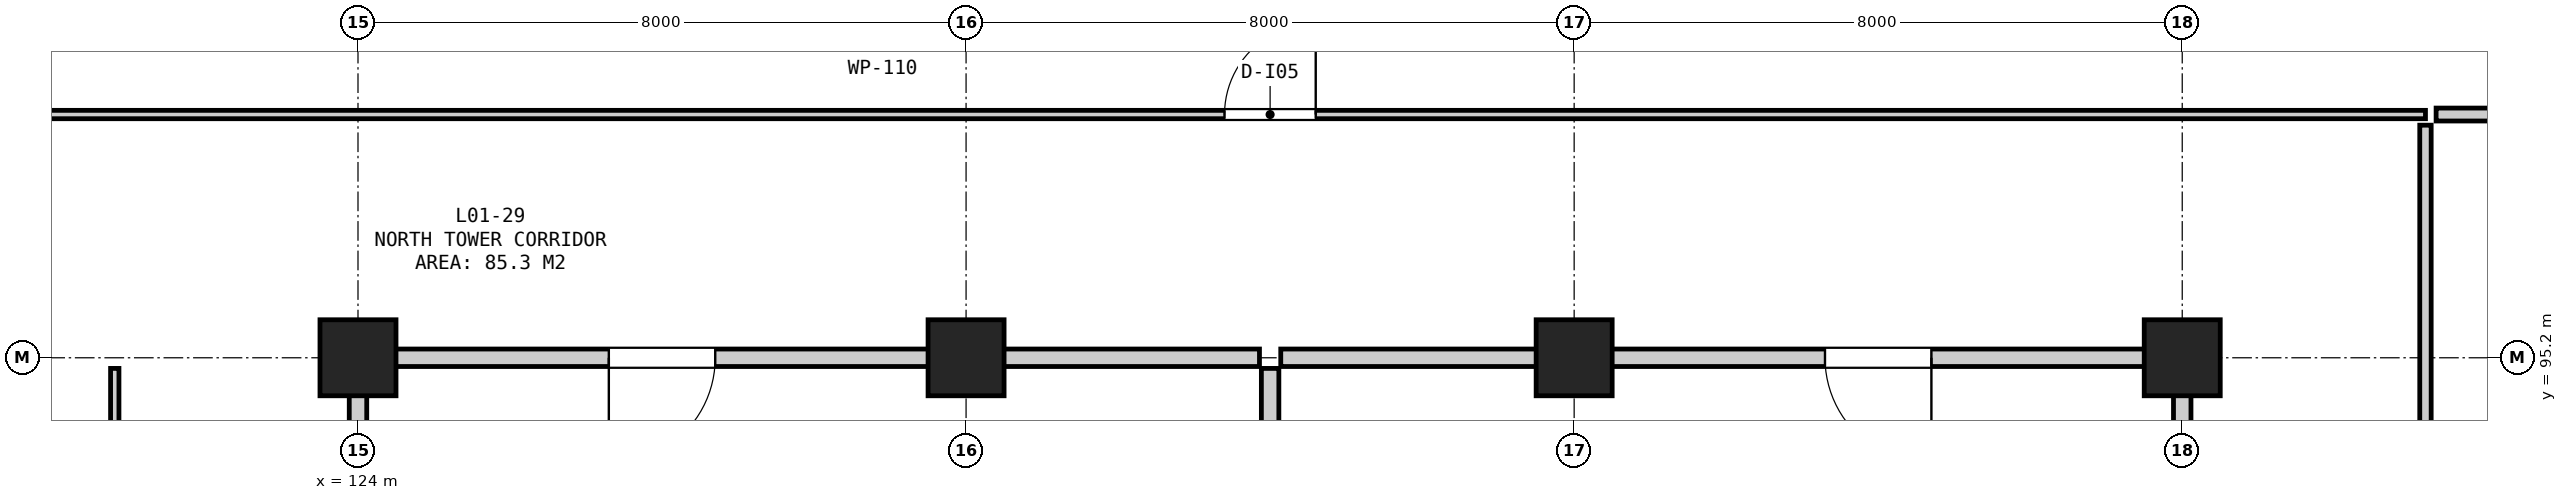
"""IFC4 building model, lengths in metres.
Left out: names, types, materials, properties, quantities, classifications, styles, units other than length and angle.
Written with IfcOpenShell. Run it as: python <this file> out.ifc"""

import sys

from ifc_helpers import new_model, si_unit, direction, frame, frame_2d, origin, origin_2d, place, context, subcontext, project, spatial, rectangle, extrude, element, fill, save


model = new_model("IFC4")
c1 = context("Model", 3, precision=1e-05, world=origin(), true_north=direction((0.0, 1.0)))
c2 = subcontext(c1, "Body", "Model", "MODEL_VIEW")
j1 = project(units=[si_unit("LENGTHUNIT", "METRE"), si_unit("PLANEANGLEUNIT", "RADIAN")], contexts=[c1])
p1 = place(None, origin())
s1 = spatial("IfcSite", under=j1, at=p1, CompositionType="ELEMENT")
p2 = place(p1, origin())
s2 = spatial("IfcBuilding", under=s1, at=p2, CompositionType="ELEMENT")
p3 = place(p2, frame((0.0, 0.0, 5.4)))
s3 = spatial("IfcBuildingStorey", under=s2, at=p3, CompositionType="ELEMENT", Elevation=5.4)
for number, where, z_axis, x_axis in (
    (1, (124.0, 95.2, 0.0), (0.0, 0.0, 1.0), (1.0, 0.0, 0.0)),
    (2, (132.0, 95.2, 0.0), (0.0, 0.0, 1.0), (1.0, 0.0, 0.0)),
    (3, (140.0, 95.2, 0.0), (0.0, 0.0, 1.0), (1.0, 0.0, 0.0)),
    (4, (148.0, 95.2, 0.0), (0.0, 0.0, 1.0), (1.0, 0.0, 0.0)),
):
    element("IfcColumn", number, at=place(p3, frame(where, z_axis=z_axis, x_axis=x_axis)), inside=s3, PredefinedType="COLUMN", context=c2, shape_type="SweptSolid", body=[
        extrude(rectangle(XDim=1.0, YDim=1.0, at=origin_2d()), origin(), (0.0, 0.0, 1.0), 5.4),
    ])
p4 = place(p3, frame((124.14, 95.2, 0.0), z_axis=(0.0, 0.0, 1.0), x_axis=(1.0, 0.0, 0.0)))
e5 = element("IfcWall", 5, at=p4, inside=s3, PredefinedType="SOLIDWALL", context=c2, shape_type="SweptSolid", body=[
    extrude(rectangle(XDim=11.72, YDim=0.23, at=frame_2d((5.86, 0.0))), origin(), (0.0, 0.0, 1.0), 4.535),
])
p5 = place(p4, frame((3.16, 0.0, 0.0)))
e6 = element("IfcOpeningElement", 6, at=p5, cuts=e5, PredefinedType="OPENING", context=c2, shape_type="SweptSolid", body=[
    extrude(rectangle(XDim=1.4, YDim=2.2, at=frame_2d((0.7, 1.1))), frame((0.0, 0.127, 0.0), z_axis=(0.0, -1.0, 0.0), x_axis=(1.0, 0.0, 0.0)), (0.0, 0.0, 1.0), 0.254),
])
p6 = place(p3, frame((124.0, 91.54, 0.0), z_axis=(0.0, 0.0, 1.0), x_axis=(0.0, 1.0, 0.0)))
e7 = element("IfcWall", 7, at=p6, inside=s3, PredefinedType="SOLIDWALL", context=c2, shape_type="SweptSolid", body=[
    extrude(rectangle(XDim=3.52, YDim=0.23, at=frame_2d((1.76, 0.0))), origin(), (0.0, 0.0, 1.0), 4.585),
])
p7 = place(p3, frame((136.0, 91.54, 0.0), z_axis=(0.0, 0.0, 1.0), x_axis=(0.0, 1.0, 0.0)))
e8 = element("IfcWall", 8, at=p7, inside=s3, PredefinedType="SOLIDWALL", context=c2, shape_type="SweptSolid", body=[
    extrude(rectangle(XDim=3.52, YDim=0.23, at=frame_2d((1.76, 0.0))), origin(), (0.0, 0.0, 1.0), 5.1),
])
p8 = place(p3, frame((136.14, 95.2, 0.0), z_axis=(0.0, 0.0, 1.0), x_axis=(1.0, 0.0, 0.0)))
e9 = element("IfcWall", 9, at=p8, inside=s3, PredefinedType="SOLIDWALL", context=c2, shape_type="SweptSolid", body=[
    extrude(rectangle(XDim=11.72, YDim=0.23, at=frame_2d((5.86, 0.0))), origin(), (0.0, 0.0, 1.0), 4.535),
])
p9 = place(p8, frame((7.16, 0.0, 0.0)))
e10 = element("IfcOpeningElement", 10, at=p9, cuts=e9, PredefinedType="OPENING", context=c2, shape_type="SweptSolid", body=[
    extrude(rectangle(XDim=1.4, YDim=2.2, at=frame_2d((0.7, 1.1))), frame((0.0, 0.127, 0.0), z_axis=(0.0, -1.0, 0.0), x_axis=(1.0, 0.0, 0.0)), (0.0, 0.0, 1.0), 0.254),
])
p10 = place(p3, frame((148.0, 91.54, 0.0), z_axis=(0.0, 0.0, 1.0), x_axis=(0.0, 1.0, 0.0)))
e11 = element("IfcWall", 11, at=p10, inside=s3, PredefinedType="SOLIDWALL", context=c2, shape_type="SweptSolid", body=[
    extrude(rectangle(XDim=3.52, YDim=0.23, at=frame_2d((1.76, 0.0))), origin(), (0.0, 0.0, 1.0), 4.485),
])
p11 = place(p3, frame((120.8, 87.34, 0.0), z_axis=(0.0, 0.0, 1.0), x_axis=(0.0, 1.0, 0.0)))
e12 = element("IfcWall", 12, at=p11, inside=s3, PredefinedType="PARTITIONING", context=c2, shape_type="SweptSolid", body=[
    extrude(rectangle(XDim=7.72, YDim=0.11, at=frame_2d((3.86, 0.0))), origin(), (0.0, 0.0, 1.0), 5.1),
])
p12 = place(p3, frame((151.34, 98.4, 0.0), z_axis=(0.0, 0.0, 1.0), x_axis=(1.0, 0.0, 0.0)))
e13 = element("IfcWall", 13, at=p12, inside=s3, PredefinedType="PARTITIONING", context=c2, shape_type="SweptSolid", body=[
    extrude(rectangle(XDim=16.455, YDim=0.17, at=frame_2d((8.228, 0.0))), origin(), (0.0, 0.0, 1.0), 5.1),
])
p13 = place(p3, frame((151.2, 76.14, 0.0), z_axis=(0.0, 0.0, 1.0), x_axis=(0.0, 1.0, 0.0)))
e14 = element("IfcWall", 14, at=p13, inside=s3, PredefinedType="PARTITIONING", context=c2, shape_type="SweptSolid", body=[
    extrude(rectangle(XDim=22.12, YDim=0.15, at=frame_2d((11.06, 0.0))), origin(), (0.0, 0.0, 1.0), 5.1),
])
p14 = place(p13, frame((10.46, 0.0, 0.0)))
e15 = element("IfcOpeningElement", 15, at=p14, cuts=e14, PredefinedType="OPENING", context=c2, shape_type="SweptSolid", body=[
    extrude(rectangle(XDim=1.2, YDim=2.15, at=frame_2d((0.6, 1.075))), frame((0.0, 0.087, 0.0), z_axis=(0.0, -1.0, 0.0), x_axis=(1.0, 0.0, 0.0)), (0.0, 0.0, 1.0), 0.174),
])
p15 = place(p3, frame((110.605, 98.4, 0.0), z_axis=(0.0, 0.0, 1.0), x_axis=(1.0, 0.0, 0.0)))
e16 = element("IfcWall", 16, at=p15, inside=s3, PredefinedType="PARTITIONING", context=c2, shape_type="SweptSolid", body=[
    extrude(rectangle(XDim=40.595, YDim=0.11, at=frame_2d((20.297, 0.0))), origin(), (0.0, 0.0, 1.0), 5.1),
])
p16 = place(p15, frame((24.795, 0.0, 0.0)))
e17 = element("IfcOpeningElement", 17, at=p16, cuts=e16, PredefinedType="OPENING", context=c2, shape_type="SweptSolid", body=[
    extrude(rectangle(XDim=1.2, YDim=2.15, at=frame_2d((0.6, 1.075))), frame((0.0, 0.067, 0.0), z_axis=(0.0, -1.0, 0.0), x_axis=(1.0, 0.0, 0.0)), (0.0, 0.0, 1.0), 0.134),
])
p17 = place(p5, frame((1.4, 0.0, 0.0), z_axis=(0.0, 0.0, 1.0), x_axis=(-1.0, 0.0, 0.0)))
e18 = element("IfcDoor", 18, at=p17, inside=s3, OperationType="SINGLE_SWING_RIGHT", PredefinedType="DOOR", context=c2, shape_type="SweptSolid", body=[
    extrude(rectangle(XDim=1.4, YDim=2.2, at=frame_2d((0.7, 1.1))), frame((0.0, 0.025, 0.0), z_axis=(0.0, -1.0, 0.0), x_axis=(1.0, 0.0, 0.0)), (0.0, 0.0, 1.0), 0.05),
])
fill(e6, e18)
p18 = place(p9, frame((1.4, 0.0, 0.0), z_axis=(0.0, 0.0, 1.0), x_axis=(-1.0, 0.0, 0.0)))
e19 = element("IfcDoor", 19, at=p18, inside=s3, OperationType="SINGLE_SWING_LEFT", PredefinedType="DOOR", context=c2, shape_type="SweptSolid", body=[
    extrude(rectangle(XDim=1.4, YDim=2.2, at=frame_2d((0.7, 1.1))), frame((0.0, 0.025, 0.0), z_axis=(0.0, -1.0, 0.0), x_axis=(1.0, 0.0, 0.0)), (0.0, 0.0, 1.0), 0.05),
])
fill(e10, e19)
p19 = place(p16, origin())
e20 = element("IfcDoor", 20, at=p19, inside=s3, OperationType="SINGLE_SWING_RIGHT", PredefinedType="DOOR", context=c2, shape_type="SweptSolid", body=[
    extrude(rectangle(XDim=1.2, YDim=2.15, at=frame_2d((0.6, 1.075))), frame((0.0, 0.025, 0.0), z_axis=(0.0, -1.0, 0.0), x_axis=(1.0, 0.0, 0.0)), (0.0, 0.0, 1.0), 0.05),
])
fill(e17, e20)
save(model, sys.argv[1])
